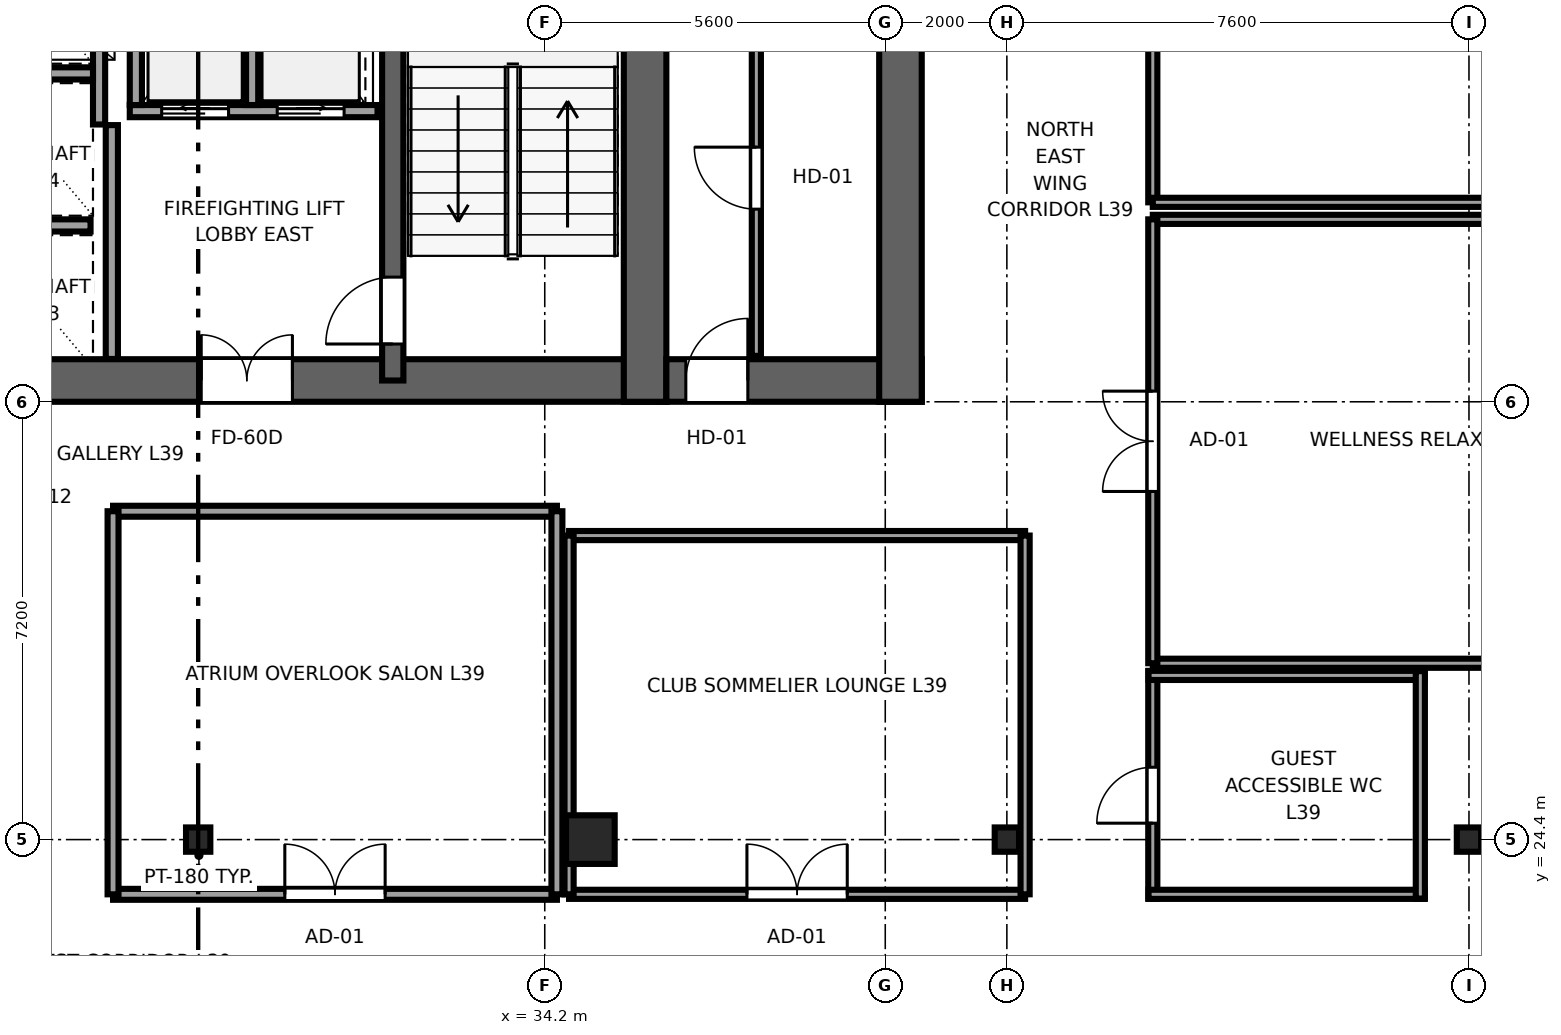
"""IFC4 building model, lengths in metres.
Left out: names, types, materials, properties, quantities, classifications, styles, units other than length and angle.
Written with IfcOpenShell. Run it as: python <this file> out.ifc"""

import sys

from ifc_helpers import new_model, si_unit, direction, frame, frame_2d, origin, origin_2d, place, context, subcontext, project, spatial, rectangle, i_section, extrude, source, transform, mapped, element, fill, save


model = new_model("IFC4")
c1 = context("Model", 3, precision=1e-05, world=origin(), true_north=direction((0.0, 1.0)))
c2 = subcontext(c1, "Body", "Model", "MODEL_VIEW")
j1 = project(units=[si_unit("LENGTHUNIT", "METRE"), si_unit("PLANEANGLEUNIT", "RADIAN")], contexts=[c1])
p1 = place(None, origin())
s1 = spatial("IfcSite", under=j1, at=p1, CompositionType="ELEMENT")
p2 = place(p1, origin())
s2 = spatial("IfcBuilding", under=s1, at=p2, CompositionType="ELEMENT")
p3 = place(p2, frame((0.0, 0.0, 150.6)))
s3 = spatial("IfcBuildingStorey", under=s2, at=p3, CompositionType="ELEMENT", Elevation=150.6)
p4 = place(p3, frame((9.8, 31.95, 0.0), z_axis=(0.0, 0.0, 1.0), x_axis=(1.0, 0.0, 0.0)))
e1 = element("IfcWall", 1, at=p4, inside=s3, PredefinedType="SHEAR", context=c2, shape_type="SweptSolid", body=[
    extrude(rectangle(XDim=26.4, YDim=0.7, at=frame_2d((13.2, 0.0))), origin(), (0.0, 0.0, 1.0), 3.55),
])
p5 = place(p4, frame((7.65, 0.0, 0.0), z_axis=(0.0, 0.0, 1.0), x_axis=(-1.0, 0.0, 0.0)))
e2 = element("IfcOpeningElement", 2, at=p5, cuts=e1, PredefinedType="OPENING", context=c2, shape_type="SweptSolid", body=[
    extrude(rectangle(XDim=1.5, YDim=2.04, at=frame_2d((0.75, 1.02))), frame((0.0, 0.36, 0.0), z_axis=(0.0, -1.0, 0.0), x_axis=(1.0, 0.0, 0.0)), (0.0, 0.0, 1.0), 0.72),
])
p6 = place(p4, frame((13.95, 0.0, 0.0), z_axis=(0.0, 0.0, 1.0), x_axis=(-1.0, 0.0, 0.0)))
e3 = element("IfcOpeningElement", 3, at=p6, cuts=e1, PredefinedType="OPENING", context=c2, shape_type="SweptSolid", body=[
    extrude(rectangle(XDim=1.5, YDim=2.04, at=frame_2d((0.75, 1.02))), frame((0.0, 0.36, 0.0), z_axis=(0.0, -1.0, 0.0), x_axis=(1.0, 0.0, 0.0)), (0.0, 0.0, 1.0), 0.72),
])
p7 = place(p4, frame((20.25, 0.0, 0.0), z_axis=(0.0, 0.0, 1.0), x_axis=(-1.0, 0.0, 0.0)))
e4 = element("IfcOpeningElement", 4, at=p7, cuts=e1, PredefinedType="OPENING", context=c2, shape_type="SweptSolid", body=[
    extrude(rectangle(XDim=1.5, YDim=2.04, at=frame_2d((0.75, 1.02))), frame((0.0, 0.36, 0.0), z_axis=(0.0, -1.0, 0.0), x_axis=(1.0, 0.0, 0.0)), (0.0, 0.0, 1.0), 0.72),
])
p8 = place(p3, frame((35.85, 31.6, 0.0), z_axis=(0.0, 0.0, 1.0), x_axis=(0.0, 1.0, 0.0)))
e5 = element("IfcWall", 5, at=p8, inside=s3, PredefinedType="SHEAR", context=c2, shape_type="SweptSolid", body=[
    extrude(rectangle(XDim=13.6, YDim=0.7, at=frame_2d((6.8, 0.0))), origin(), (0.0, 0.0, 1.0), 3.55),
])
p9 = place(p3, frame((31.7, 31.95, 0.0), z_axis=(0.0, 0.0, 1.0), x_axis=(0.0, 1.0, 0.0)))
e6 = element("IfcWall", 6, at=p9, inside=s3, PredefinedType="SHEAR", context=c2, shape_type="SweptSolid", body=[
    extrude(rectangle(XDim=12.9, YDim=0.35, at=frame_2d((6.45, 0.0))), origin(), (0.0, 0.0, 1.0), 3.55),
])
p10 = place(p9, frame((1.7, 0.0, 0.0), z_axis=(0.0, 0.0, 1.0), x_axis=(-1.0, 0.0, 0.0)))
e7 = element("IfcOpeningElement", 7, at=p10, cuts=e6, PredefinedType="OPENING", context=c2, shape_type="SweptSolid", body=[
    extrude(rectangle(XDim=1.1, YDim=2.12, at=frame_2d((0.55, 1.06))), frame((0.0, 0.185, 0.0), z_axis=(0.0, -1.0, 0.0), x_axis=(1.0, 0.0, 0.0)), (0.0, 0.0, 1.0), 0.37),
])
p11 = place(p3, frame((36.2, 31.95, 0.0), z_axis=(0.0, 0.0, 1.0), x_axis=(1.0, 0.0, 0.0)))
e8 = element("IfcWall", 8, at=p11, inside=s3, PredefinedType="SHEAR", context=c2, shape_type="SweptSolid", body=[
    extrude(rectangle(XDim=4.2, YDim=0.7, at=frame_2d((2.1, 0.0))), origin(), (0.0, 0.0, 1.0), 3.55),
])
p12 = place(p11, frame((1.34, 0.0, 0.0), z_axis=(0.0, 0.0, 1.0), x_axis=(-1.0, 0.0, 0.0)))
e9 = element("IfcOpeningElement", 9, at=p12, cuts=e8, PredefinedType="OPENING", context=c2, shape_type="SweptSolid", body=[
    extrude(rectangle(XDim=1.02, YDim=2.03, at=frame_2d((0.51, 1.015))), frame((0.0, 0.36, 0.0), z_axis=(0.0, -1.0, 0.0), x_axis=(1.0, 0.0, 0.0)), (0.0, 0.0, 1.0), 0.72),
])
p13 = place(p3, frame((40.05, 31.6, 0.0), z_axis=(0.0, 0.0, 1.0), x_axis=(0.0, 1.0, 0.0)))
e10 = element("IfcWall", 10, at=p13, inside=s3, PredefinedType="SHEAR", context=c2, shape_type="SweptSolid", body=[
    extrude(rectangle(XDim=13.6, YDim=0.7, at=frame_2d((6.8, 0.0))), origin(), (0.0, 0.0, 1.0), 3.55),
])
m1 = source(origin(), c2, "Body", "SweptSolid", [
    extrude(rectangle(XDim=0.8, YDim=0.8, at=origin_2d()), origin(), (0.0, 0.0, 1.0), 3.55),
])
p14 = place(p3, frame((34.95, 24.4, 0.0), z_axis=(0.0, 0.0, 1.0), x_axis=(1.0, 0.0, 0.0)))
e11 = element("IfcColumn", 11, at=p14, inside=s3, PredefinedType="COLUMN", context=c2, shape_type="MappedRepresentation", body=[
    mapped(m1, transform((0.0, 0.0, 0.0), x_axis=(1.0, 0.0, 0.0), y_axis=(0.0, 1.0, 0.0), z_axis=(0.0, 0.0, 1.0), scale=1.0)),
])
m2 = source(origin(), c2, "Body", "SweptSolid", [
    extrude(i_section(OverallWidth=0.4, OverallDepth=0.4, WebThickness=0.02, FlangeThickness=0.035, at=origin_2d()), origin(), (0.0, 0.0, 1.0), 3.55),
])
for number, where, z_axis, x_axis in (
    (12, (41.8, 24.4, 0.0), (0.0, 0.0, 1.0), (1.0, 0.0, 0.0)),
    (13, (49.4, 24.4, 0.0), (0.0, 0.0, 1.0), (1.0, 0.0, 0.0)),
    (14, (28.5, 24.4, 0.0), (0.0, 0.0, 1.0), (1.0, 0.0, 0.0)),
):
    element("IfcColumn", number, at=place(p3, frame(where, z_axis=z_axis, x_axis=x_axis)), inside=s3, PredefinedType="COLUMN", context=c2, shape_type="MappedRepresentation", body=[
        mapped(m2, transform((0.0, 0.0, 0.0), x_axis=(1.0, 0.0, 0.0), y_axis=(0.0, 1.0, 0.0), z_axis=(0.0, 0.0, 1.0), scale=1.0)),
    ])
p15 = place(p3, frame((27.08, 32.304, 0.0), z_axis=(0.0, 0.0, 1.0), x_axis=(0.0, 1.0, 0.0)))
e15 = element("IfcWall", 15, at=p15, inside=s3, PredefinedType="SOLIDWALL", context=c2, shape_type="SweptSolid", body=[
    extrude(rectangle(XDim=3.846, YDim=0.2, at=frame_2d((1.923, 0.0))), origin(), (0.0, 0.0, 1.0), 3.37),
])
p16 = place(p3, frame((27.375, 36.38, 0.0), z_axis=(0.0, 0.0, 1.0), x_axis=(1.0, 0.0, 0.0)))
e16 = element("IfcWall", 16, at=p16, inside=s3, PredefinedType="SOLIDWALL", context=c2, shape_type="SweptSolid", body=[
    extrude(rectangle(XDim=4.075, YDim=0.2, at=frame_2d((2.038, 0.0))), origin(), (0.0, 0.0, 1.0), 3.37),
])
p17 = place(p16, frame((0.525, 0.0, 0.0)))
e17 = element("IfcOpeningElement", 17, at=p17, cuts=e16, PredefinedType="OPENING", context=c2, shape_type="SweptSolid", body=[
    extrude(rectangle(XDim=1.1, YDim=2.12, at=frame_2d((0.55, 1.06))), frame((0.0, 0.11, 0.0), z_axis=(0.0, -1.0, 0.0), x_axis=(1.0, 0.0, 0.0)), (0.0, 0.0, 1.0), 0.22),
])
p18 = place(p16, frame((2.425, 0.0, 0.0)))
e18 = element("IfcOpeningElement", 18, at=p18, cuts=e16, PredefinedType="OPENING", context=c2, shape_type="SweptSolid", body=[
    extrude(rectangle(XDim=1.1, YDim=2.12, at=frame_2d((0.55, 1.06))), frame((0.0, 0.11, 0.0), z_axis=(0.0, -1.0, 0.0), x_axis=(1.0, 0.0, 0.0)), (0.0, 0.0, 1.0), 0.22),
])
for number, where, z_axis, x_axis in (
    (19, (27.475, 36.48, 0.0), (0.0, 0.0, 1.0), (0.0, 1.0, 0.0)),
    (20, (29.387, 36.48, 0.0), (0.0, 0.0, 1.0), (0.0, 1.0, 0.0)),
):
    element("IfcWall", number, at=place(p3, frame(where, z_axis=z_axis, x_axis=x_axis)), inside=s3, PredefinedType="SOLIDWALL", context=c2, shape_type="SweptSolid", body=[
        extrude(rectangle(XDim=2.54, YDim=0.2, at=frame_2d((1.27, 0.0))), origin(), (0.0, 0.0, 1.0), 3.37),
    ])
p19 = place(p3, frame((26.87, 36.16, 0.0), z_axis=(0.0, 0.0, 1.0), x_axis=(0.0, 1.0, 0.0)))
e21 = element("IfcWall", 21, at=p19, inside=s3, PredefinedType="SOLIDWALL", context=c2, shape_type="SweptSolid", body=[
    extrude(rectangle(XDim=8.336, YDim=0.2, at=frame_2d((4.168, 0.0))), origin(), (0.0, 0.0, 1.0), 3.37),
])
p20 = place(p3, frame((24.93, 34.5, 0.0), z_axis=(0.0, 0.0, 1.0), x_axis=(1.0, 0.0, 0.0)))
e22 = element("IfcWall", 22, at=p20, inside=s3, PredefinedType="SOLIDWALL", context=c2, shape_type="SweptSolid", body=[
    extrude(rectangle(XDim=1.8, YDim=0.2, at=frame_2d((0.9, 0.0))), origin(), (0.0, 0.0, 1.0), 3.37),
])
p21 = place(p3, frame((24.93, 37.0, 0.0), z_axis=(0.0, 0.0, 1.0), x_axis=(1.0, 0.0, 0.0)))
e23 = element("IfcWall", 23, at=p21, inside=s3, PredefinedType="SOLIDWALL", context=c2, shape_type="SweptSolid", body=[
    extrude(rectangle(XDim=1.84, YDim=0.2, at=frame_2d((0.92, 0.0))), origin(), (0.0, 0.0, 1.0), 3.37),
])
p22 = place(p3, frame((37.68, 32.355, 0.0), z_axis=(0.0, 0.0, 1.0), x_axis=(0.0, 1.0, 0.0)))
e24 = element("IfcWall", 24, at=p22, inside=s3, PredefinedType="PARTITIONING", context=c2, shape_type="SweptSolid", body=[
    extrude(rectangle(XDim=5.845, YDim=0.15, at=frame_2d((2.922, 0.0))), origin(), (0.0, 0.0, 1.0), 3.37),
])
p23 = place(p22, frame((2.413, 0.0, 0.0)))
e25 = element("IfcOpeningElement", 25, at=p23, cuts=e24, PredefinedType="OPENING", context=c2, shape_type="SweptSolid", body=[
    extrude(rectangle(XDim=1.02, YDim=2.03, at=frame_2d((0.51, 1.015))), frame((0.0, 0.085, 0.0), z_axis=(0.0, -1.0, 0.0), x_axis=(1.0, 0.0, 0.0)), (0.0, 0.0, 1.0), 0.17),
])
p24 = place(p3, frame((44.2, 23.43, 0.0), z_axis=(0.0, 0.0, 1.0), x_axis=(0.0, 1.0, 0.0)))
e26 = element("IfcWall", 26, at=p24, inside=s3, PredefinedType="PARTITIONING", context=c2, shape_type="SweptSolid", body=[
    extrude(rectangle(XDim=3.74, YDim=0.15, at=frame_2d((1.87, 0.0))), origin(), (0.0, 0.0, 1.0), 3.37),
])
p25 = place(p24, frame((1.24, 0.0, 0.0)))
e27 = element("IfcOpeningElement", 27, at=p25, cuts=e26, PredefinedType="OPENING", context=c2, shape_type="SweptSolid", body=[
    extrude(rectangle(XDim=0.92, YDim=2.01, at=frame_2d((0.46, 1.005))), frame((0.0, 0.085, 0.0), z_axis=(0.0, -1.0, 0.0), x_axis=(1.0, 0.0, 0.0)), (0.0, 0.0, 1.0), 0.17),
])
for number, where, z_axis, x_axis in (
    (28, (44.13, 23.5, 0.0), (0.0, 0.0, 1.0), (1.0, 0.0, 0.0)),
    (29, (44.13, 27.1, 0.0), (0.0, 0.0, 1.0), (1.0, 0.0, 0.0)),
):
    element("IfcWall", number, at=place(p3, frame(where, z_axis=z_axis, x_axis=x_axis)), inside=s3, PredefinedType="PARTITIONING", context=c2, shape_type="SweptSolid", body=[
        extrude(rectangle(XDim=4.54, YDim=0.15, at=frame_2d((2.27, 0.0))), origin(), (0.0, 0.0, 1.0), 3.37),
    ])
p26 = place(p3, frame((48.6, 23.43, 0.0), z_axis=(0.0, 0.0, 1.0), x_axis=(0.0, 1.0, 0.0)))
e30 = element("IfcWall", 30, at=p26, inside=s3, PredefinedType="PARTITIONING", context=c2, shape_type="SweptSolid", body=[
    extrude(rectangle(XDim=3.74, YDim=0.15, at=frame_2d((1.87, 0.0))), origin(), (0.0, 0.0, 1.0), 3.37),
])
for number, where, z_axis, x_axis in (
    (31, (44.2, 27.3, 0.0), (0.0, 0.0, 1.0), (1.0, 0.0, 0.0)),
    (32, (44.2, 34.6, 0.0), (0.0, 0.0, 1.0), (1.0, 0.0, 0.0)),
):
    element("IfcWall", number, at=place(p3, frame(where, z_axis=z_axis, x_axis=x_axis)), inside=s3, PredefinedType="PARTITIONING", context=c2, shape_type="SweptSolid", body=[
        extrude(rectangle(XDim=9.795, YDim=0.15, at=frame_2d((4.897, 0.0))), origin(), (0.0, 0.0, 1.0), 3.37),
    ])
p27 = place(p3, frame((44.2, 27.3, 0.0), z_axis=(0.0, 0.0, 1.0), x_axis=(0.0, 1.0, 0.0)))
e33 = element("IfcWall", 33, at=p27, inside=s3, PredefinedType="PARTITIONING", context=c2, shape_type="SweptSolid", body=[
    extrude(rectangle(XDim=7.3, YDim=0.15, at=frame_2d((3.65, 0.0))), origin(), (0.0, 0.0, 1.0), 3.37),
])
p28 = place(p27, frame((2.825, 0.0, 0.0)))
e34 = element("IfcOpeningElement", 34, at=p28, cuts=e33, PredefinedType="OPENING", context=c2, shape_type="SweptSolid", body=[
    extrude(rectangle(XDim=1.65, YDim=2.15, at=frame_2d((0.825, 1.075))), frame((0.0, 0.085, 0.0), z_axis=(0.0, -1.0, 0.0), x_axis=(1.0, 0.0, 0.0)), (0.0, 0.0, 1.0), 0.17),
])
p29 = place(p3, frame((44.2, 34.88, 0.0), z_axis=(0.0, 0.0, 1.0), x_axis=(0.0, 1.0, 0.0)))
e35 = element("IfcWall", 35, at=p29, inside=s3, PredefinedType="PARTITIONING", context=c2, shape_type="SweptSolid", body=[
    extrude(rectangle(XDim=9.33, YDim=0.15, at=frame_2d((4.665, 0.0))), origin(), (0.0, 0.0, 1.0), 3.37),
])
p30 = place(p29, frame((4.12, 0.0, 0.0)))
e36 = element("IfcOpeningElement", 36, at=p30, cuts=e35, PredefinedType="OPENING", context=c2, shape_type="SweptSolid", body=[
    extrude(rectangle(XDim=0.98, YDim=2.12, at=frame_2d((0.49, 1.06))), frame((0.0, 0.085, 0.0), z_axis=(0.0, -1.0, 0.0), x_axis=(1.0, 0.0, 0.0)), (0.0, 0.0, 1.0), 0.17),
])
p31 = place(p3, frame((44.2, 34.88, 0.0), z_axis=(0.0, 0.0, 1.0), x_axis=(1.0, 0.0, 0.0)))
e37 = element("IfcWall", 37, at=p31, inside=s3, PredefinedType="PARTITIONING", context=c2, shape_type="SweptSolid", body=[
    extrude(rectangle(XDim=7.43, YDim=0.15, at=frame_2d((3.715, 0.0))), origin(), (0.0, 0.0, 1.0), 3.37),
])
p32 = place(p3, frame((27.1, 23.5, 0.0), z_axis=(0.0, 0.0, 1.0), x_axis=(1.0, 0.0, 0.0)))
e38 = element("IfcWall", 38, at=p32, inside=s3, PredefinedType="PARTITIONING", context=c2, shape_type="SweptSolid", body=[
    extrude(rectangle(XDim=7.3, YDim=0.18, at=frame_2d((3.65, 0.0))), origin(), (0.0, 0.0, 1.0), 3.37),
])
p33 = place(p32, frame((2.825, 0.0, 0.0)))
e39 = element("IfcOpeningElement", 39, at=p33, cuts=e38, PredefinedType="OPENING", context=c2, shape_type="SweptSolid", body=[
    extrude(rectangle(XDim=1.65, YDim=2.15, at=frame_2d((0.825, 1.075))), frame((0.0, 0.1, 0.0), z_axis=(0.0, -1.0, 0.0), x_axis=(1.0, 0.0, 0.0)), (0.0, 0.0, 1.0), 0.2),
])
p34 = place(p3, frame((27.1, 29.8, 0.0), z_axis=(0.0, 0.0, 1.0), x_axis=(1.0, 0.0, 0.0)))
e40 = element("IfcWall", 40, at=p34, inside=s3, PredefinedType="PARTITIONING", context=c2, shape_type="SweptSolid", body=[
    extrude(rectangle(XDim=7.3, YDim=0.18, at=frame_2d((3.65, 0.0))), origin(), (0.0, 0.0, 1.0), 3.37),
])
for number, where, z_axis, x_axis in (
    (41, (27.1, 23.5, 0.0), (0.0, 0.0, 1.0), (0.0, 1.0, 0.0)),
    (42, (34.4, 23.5, 0.0), (0.0, 0.0, 1.0), (0.0, 1.0, 0.0)),
):
    element("IfcWall", number, at=place(p3, frame(where, z_axis=z_axis, x_axis=x_axis)), inside=s3, PredefinedType="PARTITIONING", context=c2, shape_type="SweptSolid", body=[
        extrude(rectangle(XDim=6.3, YDim=0.18, at=frame_2d((3.15, 0.0))), origin(), (0.0, 0.0, 1.0), 3.37),
    ])
p35 = place(p3, frame((34.6, 23.5, 0.0), z_axis=(0.0, 0.0, 1.0), x_axis=(1.0, 0.0, 0.0)))
e43 = element("IfcWall", 43, at=p35, inside=s3, PredefinedType="PARTITIONING", context=c2, shape_type="SweptSolid", body=[
    extrude(rectangle(XDim=7.5, YDim=0.15, at=frame_2d((3.75, 0.0))), origin(), (0.0, 0.0, 1.0), 3.37),
])
p36 = place(p35, frame((2.925, 0.0, 0.0)))
e44 = element("IfcOpeningElement", 44, at=p36, cuts=e43, PredefinedType="OPENING", context=c2, shape_type="SweptSolid", body=[
    extrude(rectangle(XDim=1.65, YDim=2.15, at=frame_2d((0.825, 1.075))), frame((0.0, 0.085, 0.0), z_axis=(0.0, -1.0, 0.0), x_axis=(1.0, 0.0, 0.0)), (0.0, 0.0, 1.0), 0.17),
])
p37 = place(p3, frame((34.6, 29.4, 0.0), z_axis=(0.0, 0.0, 1.0), x_axis=(1.0, 0.0, 0.0)))
e45 = element("IfcWall", 45, at=p37, inside=s3, PredefinedType="PARTITIONING", context=c2, shape_type="SweptSolid", body=[
    extrude(rectangle(XDim=7.5, YDim=0.15, at=frame_2d((3.75, 0.0))), origin(), (0.0, 0.0, 1.0), 2.16),
])
p38 = place(p3, frame((34.6, 23.5, 0.0), z_axis=(0.0, 0.0, 1.0), x_axis=(0.0, 1.0, 0.0)))
e46 = element("IfcWall", 46, at=p38, inside=s3, PredefinedType="PARTITIONING", context=c2, shape_type="SweptSolid", body=[
    extrude(rectangle(XDim=5.9, YDim=0.15, at=frame_2d((2.95, 0.0))), origin(), (0.0, 0.0, 1.0), 3.37),
])
p39 = place(p3, frame((42.1, 23.5, 0.0), z_axis=(0.0, 0.0, 1.0), x_axis=(0.0, 1.0, 0.0)))
e47 = element("IfcWall", 47, at=p39, inside=s3, PredefinedType="PARTITIONING", context=c2, shape_type="SweptSolid", body=[
    extrude(rectangle(XDim=5.9, YDim=0.15, at=frame_2d((2.95, 0.0))), origin(), (0.0, 0.0, 1.0), 2.16),
])
m3 = source(origin(), c2, "Body", "SweptSolid", [
    extrude(rectangle(XDim=1.1, YDim=2.12, at=frame_2d((0.55, 1.06))), frame((0.0, 0.025, 0.0), z_axis=(0.0, -1.0, 0.0), x_axis=(1.0, 0.0, 0.0)), (0.0, 0.0, 1.0), 0.05),
])
p40 = place(p10, origin())
e48 = element("IfcDoor", 48, at=p40, inside=s3, OperationType="SINGLE_SWING_LEFT", PredefinedType="DOOR", context=c2, shape_type="MappedRepresentation", body=[
    mapped(m3, transform((0.0, 0.0, 0.0), x_axis=(1.0, 0.0, 0.0), y_axis=(0.0, 1.0, 0.0), z_axis=(0.0, 0.0, 1.0), scale=1.0)),
])
fill(e7, e48)
m4 = source(origin(), c2, "Body", "SweptSolid", [
    extrude(rectangle(XDim=1.5, YDim=2.04, at=frame_2d((0.75, 1.02))), frame((0.0, 0.025, 0.0), z_axis=(0.0, -1.0, 0.0), x_axis=(1.0, 0.0, 0.0)), (0.0, 0.0, 1.0), 0.05),
])
p41 = place(p7, origin())
e49 = element("IfcDoor", 49, at=p41, inside=s3, OperationType="DOUBLE_DOOR_SINGLE_SWING", PredefinedType="DOOR", context=c2, shape_type="MappedRepresentation", body=[
    mapped(m4, transform((0.0, 0.0, 0.0), x_axis=(1.0, 0.0, 0.0), y_axis=(0.0, 1.0, 0.0), z_axis=(0.0, 0.0, 1.0), scale=1.0)),
])
fill(e4, e49)
m5 = source(origin(), c2, "Body", "SweptSolid", [
    extrude(rectangle(XDim=1.02, YDim=2.03, at=frame_2d((0.51, 1.015))), frame((0.0, 0.025, 0.0), z_axis=(0.0, -1.0, 0.0), x_axis=(1.0, 0.0, 0.0)), (0.0, 0.0, 1.0), 0.05),
])
p42 = place(p12, origin())
e50 = element("IfcDoor", 50, at=p42, inside=s3, OperationType="SINGLE_SWING_RIGHT", PredefinedType="DOOR", context=c2, shape_type="MappedRepresentation", body=[
    mapped(m5, transform((0.0, 0.0, 0.0), x_axis=(1.0, 0.0, 0.0), y_axis=(0.0, 1.0, 0.0), z_axis=(0.0, 0.0, 1.0), scale=1.0)),
])
fill(e9, e50)
m6 = source(origin(), c2, "Body", "SweptSolid", [
    extrude(rectangle(XDim=1.1, YDim=2.12, at=frame_2d((0.55, 1.06))), frame((0.0, 0.025, 0.0), z_axis=(0.0, -1.0, 0.0), x_axis=(1.0, 0.0, 0.0)), (0.0, 0.0, 1.0), 0.05),
])
p43 = place(p17, origin())
e51 = element("IfcDoor", 51, at=p43, inside=s3, OperationType="SLIDING_TO_LEFT", PredefinedType="DOOR", context=c2, shape_type="MappedRepresentation", body=[
    mapped(m6, transform((0.0, 0.0, 0.0), x_axis=(1.0, 0.0, 0.0), y_axis=(0.0, 1.0, 0.0), z_axis=(0.0, 0.0, 1.0), scale=1.0)),
])
fill(e17, e51)
p44 = place(p18, origin())
e52 = element("IfcDoor", 52, at=p44, inside=s3, OperationType="SLIDING_TO_RIGHT", PredefinedType="DOOR", context=c2, shape_type="MappedRepresentation", body=[
    mapped(m6, transform((0.0, 0.0, 0.0), x_axis=(1.0, 0.0, 0.0), y_axis=(0.0, 1.0, 0.0), z_axis=(0.0, 0.0, 1.0), scale=1.0)),
])
fill(e18, e52)
p45 = place(p23, origin())
e53 = element("IfcDoor", 53, at=p45, inside=s3, OperationType="SINGLE_SWING_RIGHT", PredefinedType="DOOR", context=c2, shape_type="MappedRepresentation", body=[
    mapped(m5, transform((0.0, 0.0, 0.0), x_axis=(1.0, 0.0, 0.0), y_axis=(0.0, 1.0, 0.0), z_axis=(0.0, 0.0, 1.0), scale=1.0)),
])
fill(e25, e53)
m7 = source(origin(), c2, "Body", "SweptSolid", [
    extrude(rectangle(XDim=0.92, YDim=2.01, at=frame_2d((0.46, 1.005))), frame((0.0, 0.025, 0.0), z_axis=(0.0, -1.0, 0.0), x_axis=(1.0, 0.0, 0.0)), (0.0, 0.0, 1.0), 0.05),
])
p46 = place(p25, origin())
e54 = element("IfcDoor", 54, at=p46, inside=s3, OperationType="SINGLE_SWING_LEFT", PredefinedType="DOOR", context=c2, shape_type="MappedRepresentation", body=[
    mapped(m7, transform((0.0, 0.0, 0.0), x_axis=(1.0, 0.0, 0.0), y_axis=(0.0, 1.0, 0.0), z_axis=(0.0, 0.0, 1.0), scale=1.0)),
])
fill(e27, e54)
m8 = source(origin(), c2, "Body", "SweptSolid", [
    extrude(rectangle(XDim=1.65, YDim=2.15, at=frame_2d((0.825, 1.075))), frame((0.0, 0.025, 0.0), z_axis=(0.0, -1.0, 0.0), x_axis=(1.0, 0.0, 0.0)), (0.0, 0.0, 1.0), 0.05),
])
p47 = place(p28, origin())
e55 = element("IfcDoor", 55, at=p47, inside=s3, OperationType="DOUBLE_DOOR_SINGLE_SWING", PredefinedType="DOOR", context=c2, shape_type="MappedRepresentation", body=[
    mapped(m8, transform((0.0, 0.0, 0.0), x_axis=(1.0, 0.0, 0.0), y_axis=(0.0, 1.0, 0.0), z_axis=(0.0, 0.0, 1.0), scale=1.0)),
])
fill(e34, e55)
p48 = place(p33, origin())
e56 = element("IfcDoor", 56, at=p48, inside=s3, OperationType="DOUBLE_DOOR_SINGLE_SWING", PredefinedType="DOOR", context=c2, shape_type="MappedRepresentation", body=[
    mapped(m8, transform((0.0, 0.0, 0.0), x_axis=(1.0, 0.0, 0.0), y_axis=(0.0, 1.0, 0.0), z_axis=(0.0, 0.0, 1.0), scale=1.0)),
])
fill(e39, e56)
p49 = place(p36, origin())
e57 = element("IfcDoor", 57, at=p49, inside=s3, OperationType="DOUBLE_DOOR_SINGLE_SWING", PredefinedType="DOOR", context=c2, shape_type="MappedRepresentation", body=[
    mapped(m8, transform((0.0, 0.0, 0.0), x_axis=(1.0, 0.0, 0.0), y_axis=(0.0, 1.0, 0.0), z_axis=(0.0, 0.0, 1.0), scale=1.0)),
])
fill(e44, e57)
save(model, sys.argv[1])
